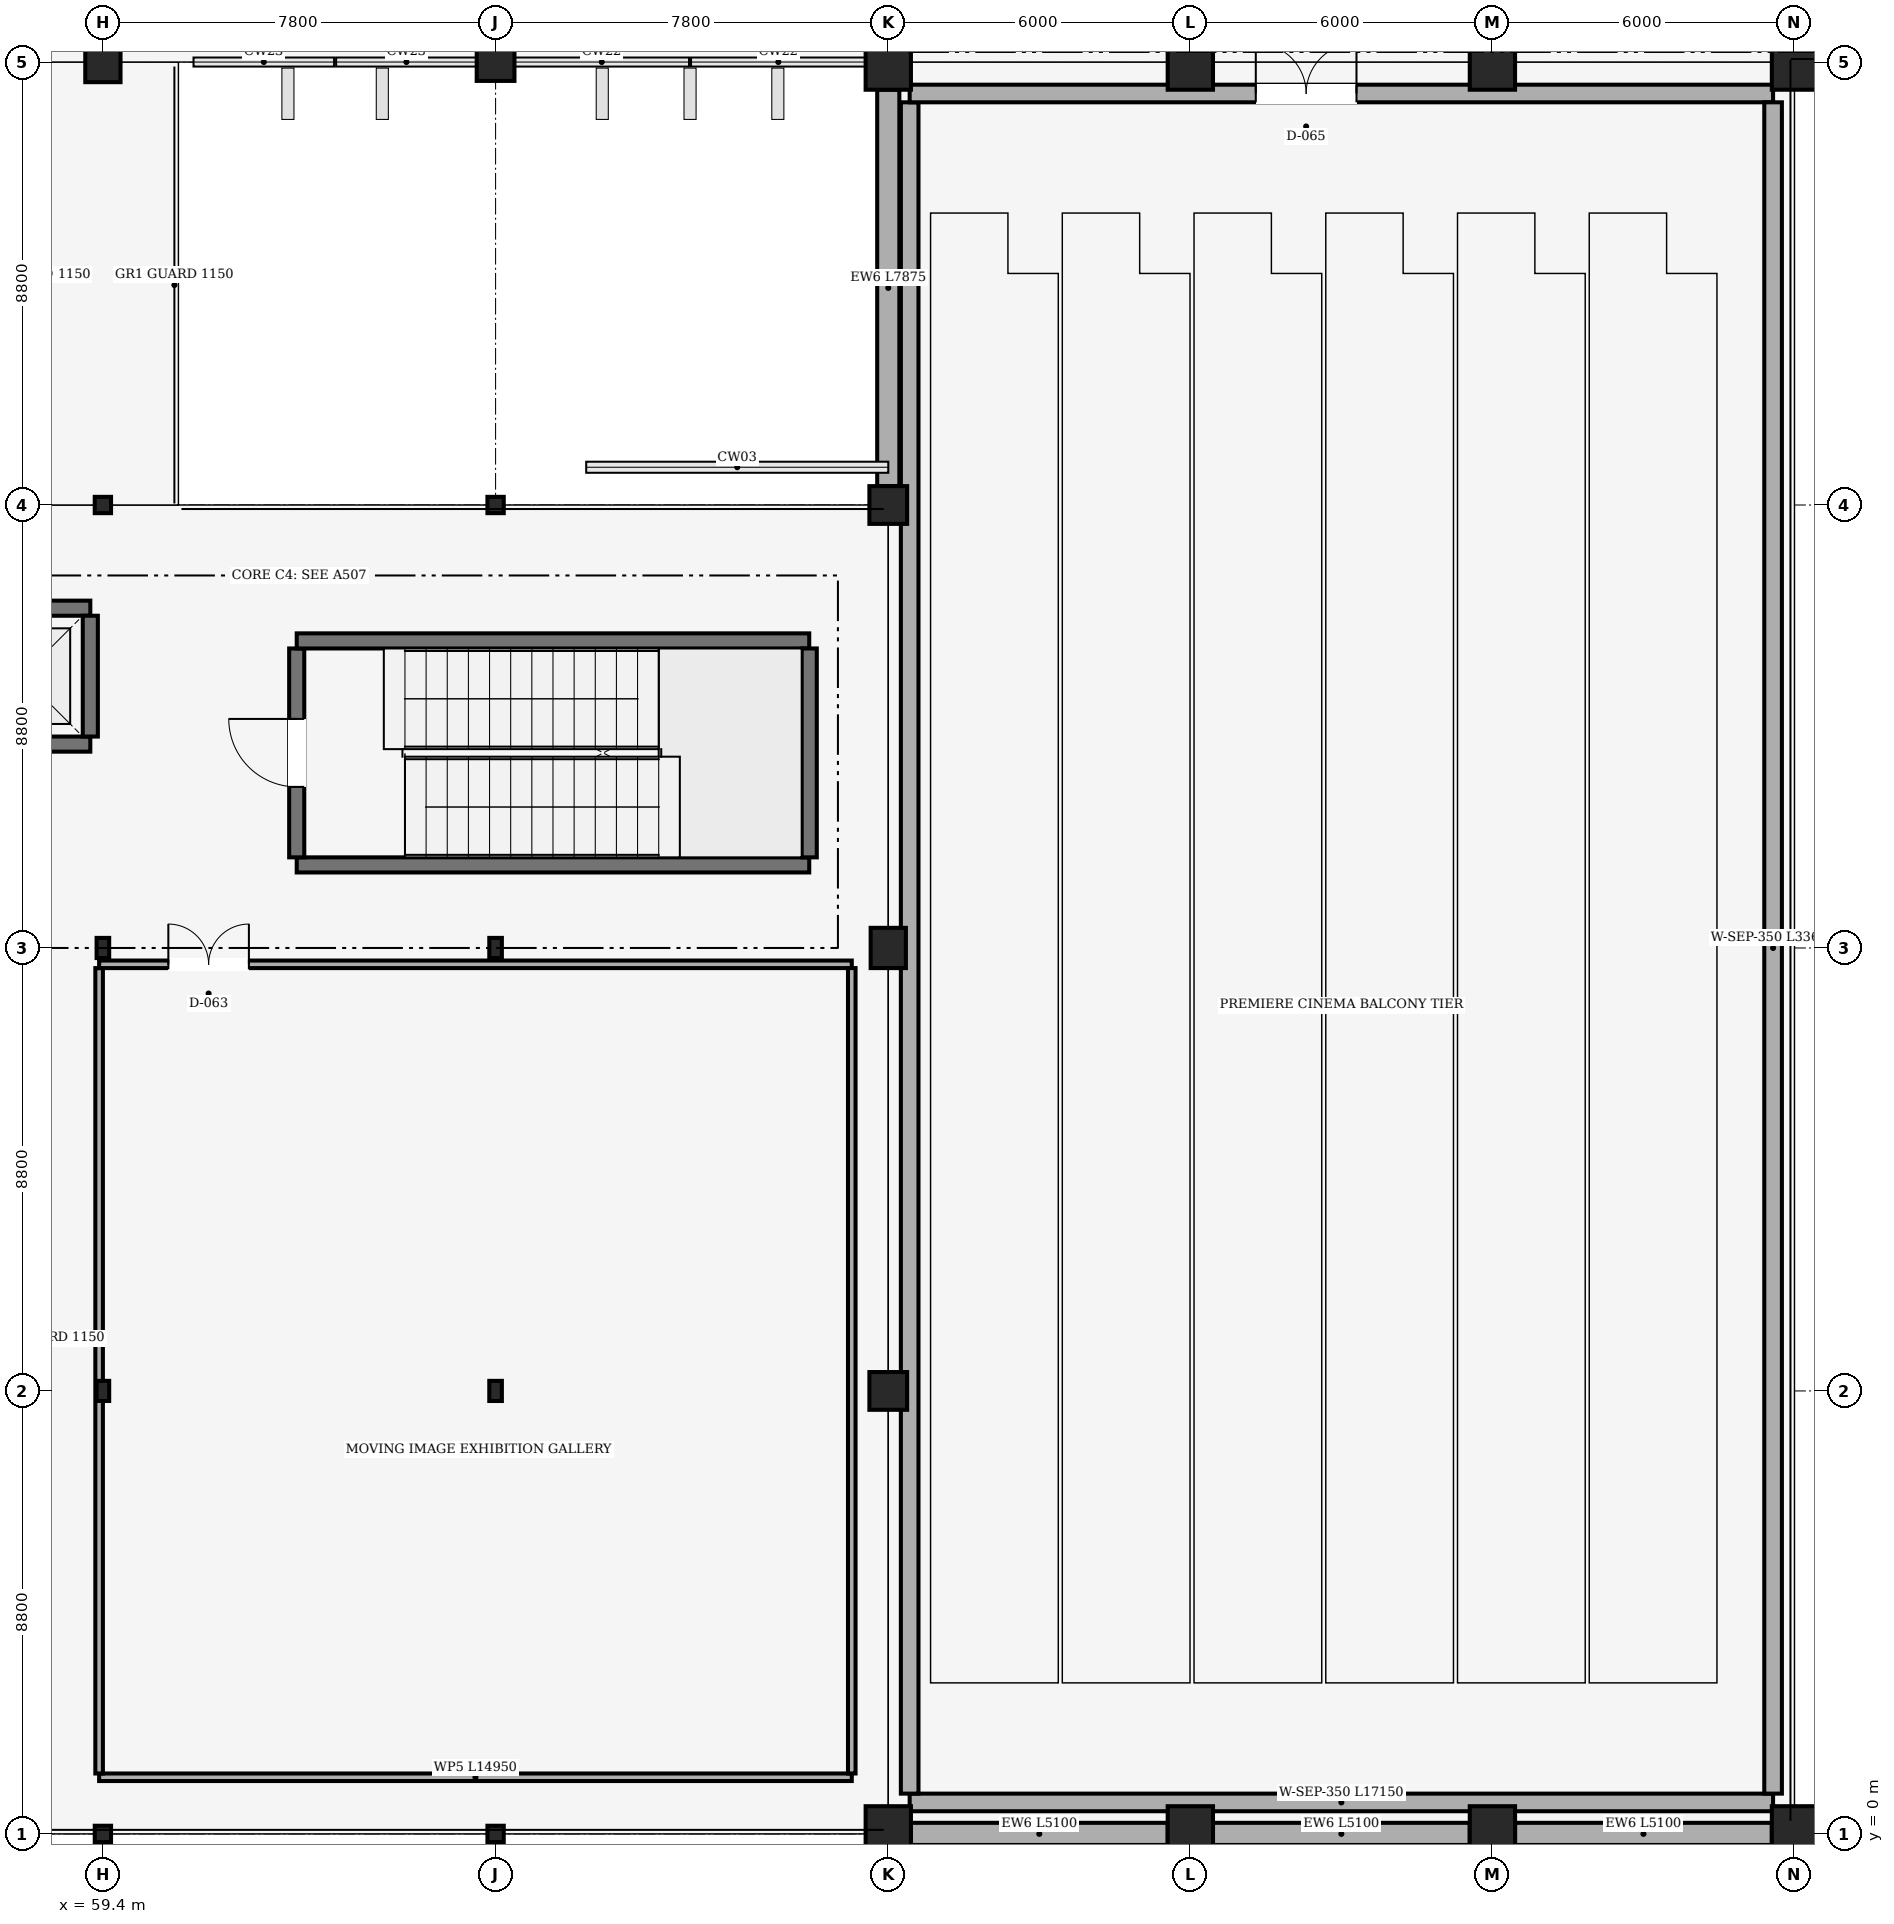
"""IFC4 building model, lengths in metres.
Left out: names, types, materials, properties, quantities, classifications, styles, units other than length and angle.
Written with IfcOpenShell. Run it as: python <this file> out.ifc"""

import sys

from ifc_helpers import new_model, si_unit, direction, frame, frame_2d, origin, origin_2d, place, context, subcontext, project, spatial, rectangle, hollow_circle, i_section, extrude, element, fill, save


model = new_model("IFC4")
c1 = context("Model", 3, precision=1e-05, world=origin(), true_north=direction((0.0, 1.0)))
c2 = subcontext(c1, "Body", "Model", "MODEL_VIEW")
j1 = project(units=[si_unit("LENGTHUNIT", "METRE"), si_unit("PLANEANGLEUNIT", "RADIAN")], contexts=[c1])
p1 = place(None, origin())
s1 = spatial("IfcSite", under=j1, at=p1, CompositionType="ELEMENT")
p2 = place(p1, origin())
s2 = spatial("IfcBuilding", under=s1, at=p2, CompositionType="ELEMENT")
p3 = place(p2, frame((0.0, 0.0, 4.5)))
s3 = spatial("IfcBuildingStorey", under=s2, at=p3, CompositionType="ELEMENT", Elevation=4.5)
p4 = place(p3, frame((59.4, 0.0, 0.0), z_axis=(0.0, 0.0, 1.0), x_axis=(1.0, 0.0, 0.0)))
e1 = element("IfcColumn", 1, at=p4, inside=s3, PredefinedType="COLUMN", context=c2, shape_type="SweptSolid", body=[
    extrude(hollow_circle(Radius=0.162, WallThickness=0.01, at=origin_2d()), origin(), (0.0, 0.0, 1.0), 3.65),
])
for number, where, z_axis, x_axis in (
    (2, (59.4, 8.8, 0.0), (0.0, 0.0, 1.0), (1.0, 0.0, 0.0)),
    (3, (59.4, 17.6, 0.0), (0.0, 0.0, 1.0), (1.0, 0.0, 0.0)),
):
    element("IfcColumn", number, at=place(p3, frame(where, z_axis=z_axis, x_axis=x_axis)), inside=s3, PredefinedType="COLUMN", context=c2, shape_type="SweptSolid", body=[
        extrude(i_section(OverallWidth=0.25, OverallDepth=0.4, WebThickness=0.01, FlangeThickness=0.013, FilletRadius=0.012, at=origin_2d()), origin(), (0.0, 0.0, 1.0), 3.65),
    ])
p5 = place(p3, frame((59.4, 26.4, 0.0), z_axis=(0.0, 0.0, 1.0), x_axis=(1.0, 0.0, 0.0)))
e4 = element("IfcColumn", 4, at=p5, inside=s3, PredefinedType="COLUMN", context=c2, shape_type="SweptSolid", body=[
    extrude(hollow_circle(Radius=0.162, WallThickness=0.01, at=origin_2d()), origin(), (0.0, 0.0, 1.0), 3.65),
])
p6 = place(p3, frame((59.4, 35.2, 0.0), z_axis=(0.0, 0.0, 1.0), x_axis=(1.0, 0.0, 0.0)))
e5 = element("IfcColumn", 5, at=p6, inside=s3, PredefinedType="COLUMN", context=c2, shape_type="SweptSolid", body=[
    extrude(rectangle(XDim=0.7, YDim=0.8, at=origin_2d()), origin(), (0.0, 0.0, 1.0), 3.65),
])
p7 = place(p3, frame((67.2, 0.0, 0.0), z_axis=(0.0, 0.0, 1.0), x_axis=(1.0, 0.0, 0.0)))
e6 = element("IfcColumn", 6, at=p7, inside=s3, PredefinedType="COLUMN", context=c2, shape_type="SweptSolid", body=[
    extrude(hollow_circle(Radius=0.162, WallThickness=0.01, at=origin_2d()), origin(), (0.0, 0.0, 1.0), 3.65),
])
for number, where, z_axis, x_axis in (
    (7, (67.2, 8.8, 0.0), (0.0, 0.0, 1.0), (1.0, 0.0, 0.0)),
    (8, (67.2, 17.6, 0.0), (0.0, 0.0, 1.0), (1.0, 0.0, 0.0)),
):
    element("IfcColumn", number, at=place(p3, frame(where, z_axis=z_axis, x_axis=x_axis)), inside=s3, PredefinedType="COLUMN", context=c2, shape_type="SweptSolid", body=[
        extrude(i_section(OverallWidth=0.25, OverallDepth=0.4, WebThickness=0.01, FlangeThickness=0.013, FilletRadius=0.012, at=origin_2d()), origin(), (0.0, 0.0, 1.0), 3.65),
    ])
p8 = place(p3, frame((67.2, 26.4, 0.0), z_axis=(0.0, 0.0, 1.0), x_axis=(1.0, 0.0, 0.0)))
e9 = element("IfcColumn", 9, at=p8, inside=s3, PredefinedType="COLUMN", context=c2, shape_type="SweptSolid", body=[
    extrude(hollow_circle(Radius=0.162, WallThickness=0.01, at=origin_2d()), origin(), (0.0, 0.0, 1.0), 3.65),
])
p9 = place(p3, frame((67.2, 35.2, 0.0), z_axis=(0.0, 0.0, 1.0), x_axis=(1.0, 0.0, 0.0)))
e10 = element("IfcColumn", 10, at=p9, inside=s3, PredefinedType="COLUMN", context=c2, shape_type="SweptSolid", body=[
    extrude(rectangle(XDim=0.75, YDim=0.75, at=origin_2d()), origin(), (0.0, 0.0, 1.0), 3.65),
])
p10 = place(p3, frame((75.0, 0.0, 0.0), z_axis=(0.0, 0.0, 1.0), x_axis=(1.0, 0.0, 0.0)))
e11 = element("IfcColumn", 11, at=p10, inside=s3, PredefinedType="COLUMN", context=c2, shape_type="SweptSolid", body=[
    extrude(rectangle(XDim=0.9, YDim=1.1, at=origin_2d()), origin(), (0.0, 0.0, 1.0), 3.65),
])
p11 = place(p3, frame((75.0, 8.8, 0.0), z_axis=(0.0, 0.0, 1.0), x_axis=(1.0, 0.0, 0.0)))
e12 = element("IfcColumn", 12, at=p11, inside=s3, PredefinedType="COLUMN", context=c2, shape_type="SweptSolid", body=[
    extrude(rectangle(XDim=0.75, YDim=0.75, at=origin_2d()), origin(), (0.0, 0.0, 1.0), 3.65),
])
p12 = place(p3, frame((75.0, 17.6, 0.0), z_axis=(0.0, 0.0, 1.0), x_axis=(1.0, 0.0, 0.0)))
e13 = element("IfcColumn", 13, at=p12, inside=s3, PredefinedType="COLUMN", context=c2, shape_type="SweptSolid", body=[
    extrude(rectangle(XDim=0.7, YDim=0.8, at=origin_2d()), origin(), (0.0, 0.0, 1.0), 3.65),
])
p13 = place(p3, frame((75.0, 26.4, 0.0), z_axis=(0.0, 0.0, 1.0), x_axis=(1.0, 0.0, 0.0)))
e14 = element("IfcColumn", 14, at=p13, inside=s3, PredefinedType="COLUMN", context=c2, shape_type="SweptSolid", body=[
    extrude(rectangle(XDim=0.75, YDim=0.75, at=origin_2d()), origin(), (0.0, 0.0, 1.0), 3.65),
])
p14 = place(p3, frame((75.0, 35.2, 0.0), z_axis=(0.0, 0.0, 1.0), x_axis=(1.0, 0.0, 0.0)))
e15 = element("IfcColumn", 15, at=p14, inside=s3, PredefinedType="COLUMN", context=c2, shape_type="SweptSolid", body=[
    extrude(rectangle(XDim=0.9, YDim=1.1, at=origin_2d()), origin(), (0.0, 0.0, 1.0), 3.65),
])
p15 = place(p3, frame((81.0, 0.0, 0.0), z_axis=(0.0, 0.0, 1.0), x_axis=(1.0, 0.0, 0.0)))
e16 = element("IfcColumn", 16, at=p15, inside=s3, PredefinedType="COLUMN", context=c2, shape_type="SweptSolid", body=[
    extrude(rectangle(XDim=0.9, YDim=1.1, at=origin_2d()), origin(), (0.0, 0.0, 1.0), 3.9),
])
p16 = place(p3, frame((81.0, 35.2, 0.0), z_axis=(0.0, 0.0, 1.0), x_axis=(1.0, 0.0, 0.0)))
e17 = element("IfcColumn", 17, at=p16, inside=s3, PredefinedType="COLUMN", context=c2, shape_type="SweptSolid", body=[
    extrude(rectangle(XDim=0.9, YDim=1.1, at=origin_2d()), origin(), (0.0, 0.0, 1.0), 3.65),
])
p17 = place(p3, frame((87.0, 0.0, 0.0), z_axis=(0.0, 0.0, 1.0), x_axis=(1.0, 0.0, 0.0)))
e18 = element("IfcColumn", 18, at=p17, inside=s3, PredefinedType="COLUMN", context=c2, shape_type="SweptSolid", body=[
    extrude(rectangle(XDim=0.9, YDim=1.1, at=origin_2d()), origin(), (0.0, 0.0, 1.0), 3.9),
])
p18 = place(p3, frame((87.0, 35.2, 0.0), z_axis=(0.0, 0.0, 1.0), x_axis=(1.0, 0.0, 0.0)))
e19 = element("IfcColumn", 19, at=p18, inside=s3, PredefinedType="COLUMN", context=c2, shape_type="SweptSolid", body=[
    extrude(rectangle(XDim=0.9, YDim=1.1, at=origin_2d()), origin(), (0.0, 0.0, 1.0), 3.65),
])
p19 = place(p3, frame((93.0, 0.0, 0.0), z_axis=(0.0, 0.0, 1.0), x_axis=(1.0, 0.0, 0.0)))
e20 = element("IfcColumn", 20, at=p19, inside=s3, PredefinedType="COLUMN", context=c2, shape_type="SweptSolid", body=[
    extrude(rectangle(XDim=0.9, YDim=1.1, at=origin_2d()), origin(), (0.0, 0.0, 1.0), 3.9),
])
p20 = place(p3, frame((93.0, 35.2, 0.0), z_axis=(0.0, 0.0, 1.0), x_axis=(1.0, 0.0, 0.0)))
e21 = element("IfcColumn", 21, at=p20, inside=s3, PredefinedType="COLUMN", context=c2, shape_type="SweptSolid", body=[
    extrude(rectangle(XDim=0.9, YDim=1.1, at=origin_2d()), origin(), (0.0, 0.0, 1.0), 3.65),
])
for number, where, z_axis, x_axis in (
    (22, (92.55, 0.0, 0.0), (0.0, 0.0, 1.0), (-1.0, 0.0, 0.0)),
    (23, (86.55, 0.0, 0.0), (0.0, 0.0, 1.0), (-1.0, 0.0, 0.0)),
    (24, (80.55, 0.0, 0.0), (0.0, 0.0, 1.0), (-1.0, 0.0, 0.0)),
):
    element("IfcWall", number, at=place(p3, frame(where, z_axis=z_axis, x_axis=x_axis)), inside=s3, PredefinedType="SOLIDWALL", context=c2, shape_type="SweptSolid", body=[
        extrude(rectangle(XDim=5.1, YDim=0.44, at=frame_2d((2.55, 0.0))), origin(), (0.0, 0.0, 1.0), 3.9),
    ])
p21 = place(p3, frame((75.0, 34.65, 0.0), z_axis=(0.0, 0.0, 1.0), x_axis=(0.0, -1.0, 0.0)))
e25 = element("IfcWall", 25, at=p21, inside=s3, PredefinedType="SOLIDWALL", context=c2, shape_type="SweptSolid", body=[
    extrude(rectangle(XDim=7.875, YDim=0.44, at=frame_2d((3.938, 0.0))), origin(), (0.0, 0.0, 1.0), 3.215),
])
p22 = place(p3, frame((73.43, 19.25, 0.0), z_axis=(0.0, 0.0, 1.0), x_axis=(-1.0, 0.0, 0.0)))
e26 = element("IfcWall", 26, at=p22, inside=s3, PredefinedType="SHEAR", context=c2, shape_type="SweptSolid", body=[
    extrude(rectangle(XDim=10.18, YDim=0.3, at=frame_2d((5.09, 0.0))), origin(), (0.0, 0.0, 1.0), 3.65),
])
p23 = place(p3, frame((63.25, 19.4, 0.0), z_axis=(0.0, 0.0, 1.0), x_axis=(0.0, 1.0, 0.0)))
e27 = element("IfcWall", 27, at=p23, inside=s3, PredefinedType="SHEAR", context=c2, shape_type="SweptSolid", body=[
    extrude(rectangle(XDim=4.15, YDim=0.3, at=frame_2d((2.075, 0.0))), origin(), (0.0, 0.0, 1.0), 3.65),
])
p24 = place(p23, frame((1.4, 0.0, 0.0)))
e28 = element("IfcOpeningElement", 28, at=p24, cuts=e27, PredefinedType="OPENING", context=c2, shape_type="SweptSolid", body=[
    extrude(rectangle(XDim=1.35, YDim=2.2, at=frame_2d((0.675, 1.1))), frame((0.0, 0.15, 0.0), z_axis=(0.0, -1.0, 0.0), x_axis=(1.0, 0.0, 0.0)), (0.0, 0.0, 1.0), 0.3),
])
p25 = place(p3, frame((63.25, 23.7, 0.0), z_axis=(0.0, 0.0, 1.0), x_axis=(1.0, 0.0, 0.0)))
e29 = element("IfcWall", 29, at=p25, inside=s3, PredefinedType="SHEAR", context=c2, shape_type="SweptSolid", body=[
    extrude(rectangle(XDim=10.18, YDim=0.3, at=frame_2d((5.09, 0.0))), origin(), (0.0, 0.0, 1.0), 3.65),
])
p26 = place(p3, frame((73.43, 23.55, 0.0), z_axis=(0.0, 0.0, 1.0), x_axis=(0.0, -1.0, 0.0)))
e30 = element("IfcWall", 30, at=p26, inside=s3, PredefinedType="SHEAR", context=c2, shape_type="SweptSolid", body=[
    extrude(rectangle(XDim=4.15, YDim=0.3, at=frame_2d((2.075, 0.0))), origin(), (0.0, 0.0, 1.0), 3.65),
])
p27 = place(p3, frame((59.15, 21.65, 0.0), z_axis=(0.0, 0.0, 1.0), x_axis=(-1.0, 0.0, 0.0)))
e31 = element("IfcWall", 31, at=p27, inside=s3, PredefinedType="SHEAR", context=c2, shape_type="SweptSolid", body=[
    extrude(rectangle(XDim=2.95, YDim=0.3, at=frame_2d((1.475, 0.0))), origin(), (0.0, 0.0, 1.0), 3.65),
])
p28 = place(p27, frame((0.8, 0.0, 0.0)))
e32 = element("IfcOpeningElement", 32, at=p28, cuts=e31, PredefinedType="OPENING", context=c2, shape_type="SweptSolid", body=[
    extrude(rectangle(XDim=1.1, YDim=2.1, at=frame_2d((0.55, 1.05))), frame((0.0, 0.15, 0.0), z_axis=(0.0, -1.0, 0.0), x_axis=(1.0, 0.0, 0.0)), (0.0, 0.0, 1.0), 0.3),
])
p29 = place(p3, frame((56.2, 24.35, 0.0), z_axis=(0.0, 0.0, 1.0), x_axis=(1.0, 0.0, 0.0)))
e33 = element("IfcWall", 33, at=p29, inside=s3, PredefinedType="SHEAR", context=c2, shape_type="SweptSolid", body=[
    extrude(rectangle(XDim=2.95, YDim=0.3, at=frame_2d((1.475, 0.0))), origin(), (0.0, 0.0, 1.0), 3.65),
])
p30 = place(p3, frame((59.15, 24.2, 0.0), z_axis=(0.0, 0.0, 1.0), x_axis=(0.0, -1.0, 0.0)))
e34 = element("IfcWall", 34, at=p30, inside=s3, PredefinedType="SHEAR", context=c2, shape_type="SweptSolid", body=[
    extrude(rectangle(XDim=2.4, YDim=0.3, at=frame_2d((1.2, 0.0))), origin(), (0.0, 0.0, 1.0), 3.65),
])
p31 = place(p3, frame((74.275, 1.125, 0.0), z_axis=(0.0, 0.0, 1.0), x_axis=(-1.0, 0.0, 0.0)))
e35 = element("IfcWall", 35, at=p31, inside=s3, PredefinedType="PARTITIONING", context=c2, shape_type="SweptSolid", body=[
    extrude(rectangle(XDim=14.95, YDim=0.15, at=frame_2d((7.475, 0.0))), origin(), (0.0, 0.0, 1.0), 3.63),
])
p32 = place(p3, frame((59.325, 1.2, 0.0), z_axis=(0.0, 0.0, 1.0), x_axis=(0.0, 1.0, 0.0)))
e36 = element("IfcWall", 36, at=p32, inside=s3, PredefinedType="PARTITIONING", context=c2, shape_type="SweptSolid", body=[
    extrude(rectangle(XDim=16.0, YDim=0.15, at=frame_2d((8.0, 0.0))), origin(), (0.0, 0.0, 1.0), 2.88),
])
p33 = place(p3, frame((59.325, 17.275, 0.0), z_axis=(0.0, 0.0, 1.0), x_axis=(1.0, 0.0, 0.0)))
e37 = element("IfcWall", 37, at=p33, inside=s3, PredefinedType="PARTITIONING", context=c2, shape_type="SweptSolid", body=[
    extrude(rectangle(XDim=14.95, YDim=0.15, at=frame_2d((7.475, 0.0))), origin(), (0.0, 0.0, 1.0), 2.83),
])
p34 = place(p33, frame((1.375, 0.0, 0.0)))
e38 = element("IfcOpeningElement", 38, at=p34, cuts=e37, PredefinedType="OPENING", context=c2, shape_type="SweptSolid", body=[
    extrude(rectangle(XDim=1.6, YDim=2.2, at=frame_2d((0.8, 1.1))), frame((0.0, 0.075, 0.0), z_axis=(0.0, -1.0, 0.0), x_axis=(1.0, 0.0, 0.0)), (0.0, 0.0, 1.0), 0.15),
])
p35 = place(p3, frame((74.275, 17.2, 0.0), z_axis=(0.0, 0.0, 1.0), x_axis=(0.0, -1.0, 0.0)))
e39 = element("IfcWall", 39, at=p35, inside=s3, PredefinedType="PARTITIONING", context=c2, shape_type="SweptSolid", body=[
    extrude(rectangle(XDim=16.0, YDim=0.15, at=frame_2d((8.0, 0.0))), origin(), (0.0, 0.0, 1.0), 3.63),
])
p36 = place(p3, frame((92.575, 0.625, 0.0), z_axis=(0.0, 0.0, 1.0), x_axis=(-1.0, 0.0, 0.0)))
e40 = element("IfcWall", 40, at=p36, inside=s3, PredefinedType="SOLIDWALL", context=c2, shape_type="SweptSolid", body=[
    extrude(rectangle(XDim=17.15, YDim=0.35, at=frame_2d((8.575, 0.0))), origin(), (0.0, 0.0, 1.0), 3.63),
])
p37 = place(p3, frame((75.425, 0.8, 0.0), z_axis=(0.0, 0.0, 1.0), x_axis=(0.0, 1.0, 0.0)))
e41 = element("IfcWall", 41, at=p37, inside=s3, PredefinedType="SOLIDWALL", context=c2, shape_type="SweptSolid", body=[
    extrude(rectangle(XDim=33.6, YDim=0.35, at=frame_2d((16.8, 0.0))), origin(), (0.0, 0.0, 1.0), 2.83),
])
p38 = place(p3, frame((75.425, 34.575, 0.0), z_axis=(0.0, 0.0, 1.0), x_axis=(1.0, 0.0, 0.0)))
e42 = element("IfcWall", 42, at=p38, inside=s3, PredefinedType="SOLIDWALL", context=c2, shape_type="SweptSolid", body=[
    extrude(rectangle(XDim=17.15, YDim=0.35, at=frame_2d((8.575, 0.0))), origin(), (0.0, 0.0, 1.0), 3.63),
])
p39 = place(p38, frame((6.875, 0.0, 0.0)))
e43 = element("IfcOpeningElement", 43, at=p39, cuts=e42, PredefinedType="OPENING", context=c2, shape_type="SweptSolid", body=[
    extrude(rectangle(XDim=2.0, YDim=2.25, at=frame_2d((1.0, 1.125))), frame((0.0, 0.175, 0.0), z_axis=(0.0, -1.0, 0.0), x_axis=(1.0, 0.0, 0.0)), (0.0, 0.0, 1.0), 0.35),
])
p40 = place(p3, frame((92.575, 34.4, 0.0), z_axis=(0.0, 0.0, 1.0), x_axis=(0.0, -1.0, 0.0)))
e44 = element("IfcWall", 44, at=p40, inside=s3, PredefinedType="SOLIDWALL", context=c2, shape_type="SweptSolid", body=[
    extrude(rectangle(XDim=33.6, YDim=0.35, at=frame_2d((16.8, 0.0))), origin(), (0.0, 0.0, 1.0), 3.63),
])
p41 = place(p24, origin())
e45 = element("IfcDoor", 45, at=p41, inside=s3, OperationType="SINGLE_SWING_RIGHT", PredefinedType="DOOR", context=c2, shape_type="SweptSolid", body=[
    extrude(rectangle(XDim=1.35, YDim=2.2, at=frame_2d((0.675, 1.1))), frame((0.0, 0.025, 0.0), z_axis=(0.0, -1.0, 0.0), x_axis=(1.0, 0.0, 0.0)), (0.0, 0.0, 1.0), 0.05),
])
fill(e28, e45)
p42 = place(p34, origin())
e46 = element("IfcDoor", 46, at=p42, inside=s3, OperationType="DOUBLE_DOOR_SINGLE_SWING", PredefinedType="DOOR", context=c2, shape_type="SweptSolid", body=[
    extrude(rectangle(XDim=1.6, YDim=2.2, at=frame_2d((0.8, 1.1))), frame((0.0, 0.025, 0.0), z_axis=(0.0, -1.0, 0.0), x_axis=(1.0, 0.0, 0.0)), (0.0, 0.0, 1.0), 0.05),
])
fill(e38, e46)
p43 = place(p39, origin())
e47 = element("IfcDoor", 47, at=p43, inside=s3, OperationType="DOUBLE_DOOR_SINGLE_SWING", PredefinedType="DOOR", context=c2, shape_type="SweptSolid", body=[
    extrude(rectangle(XDim=2.0, YDim=2.25, at=frame_2d((1.0, 1.125))), frame((0.0, 0.025, 0.0), z_axis=(0.0, -1.0, 0.0), x_axis=(1.0, 0.0, 0.0)), (0.0, 0.0, 1.0), 0.05),
])
fill(e43, e47)
save(model, sys.argv[1])
